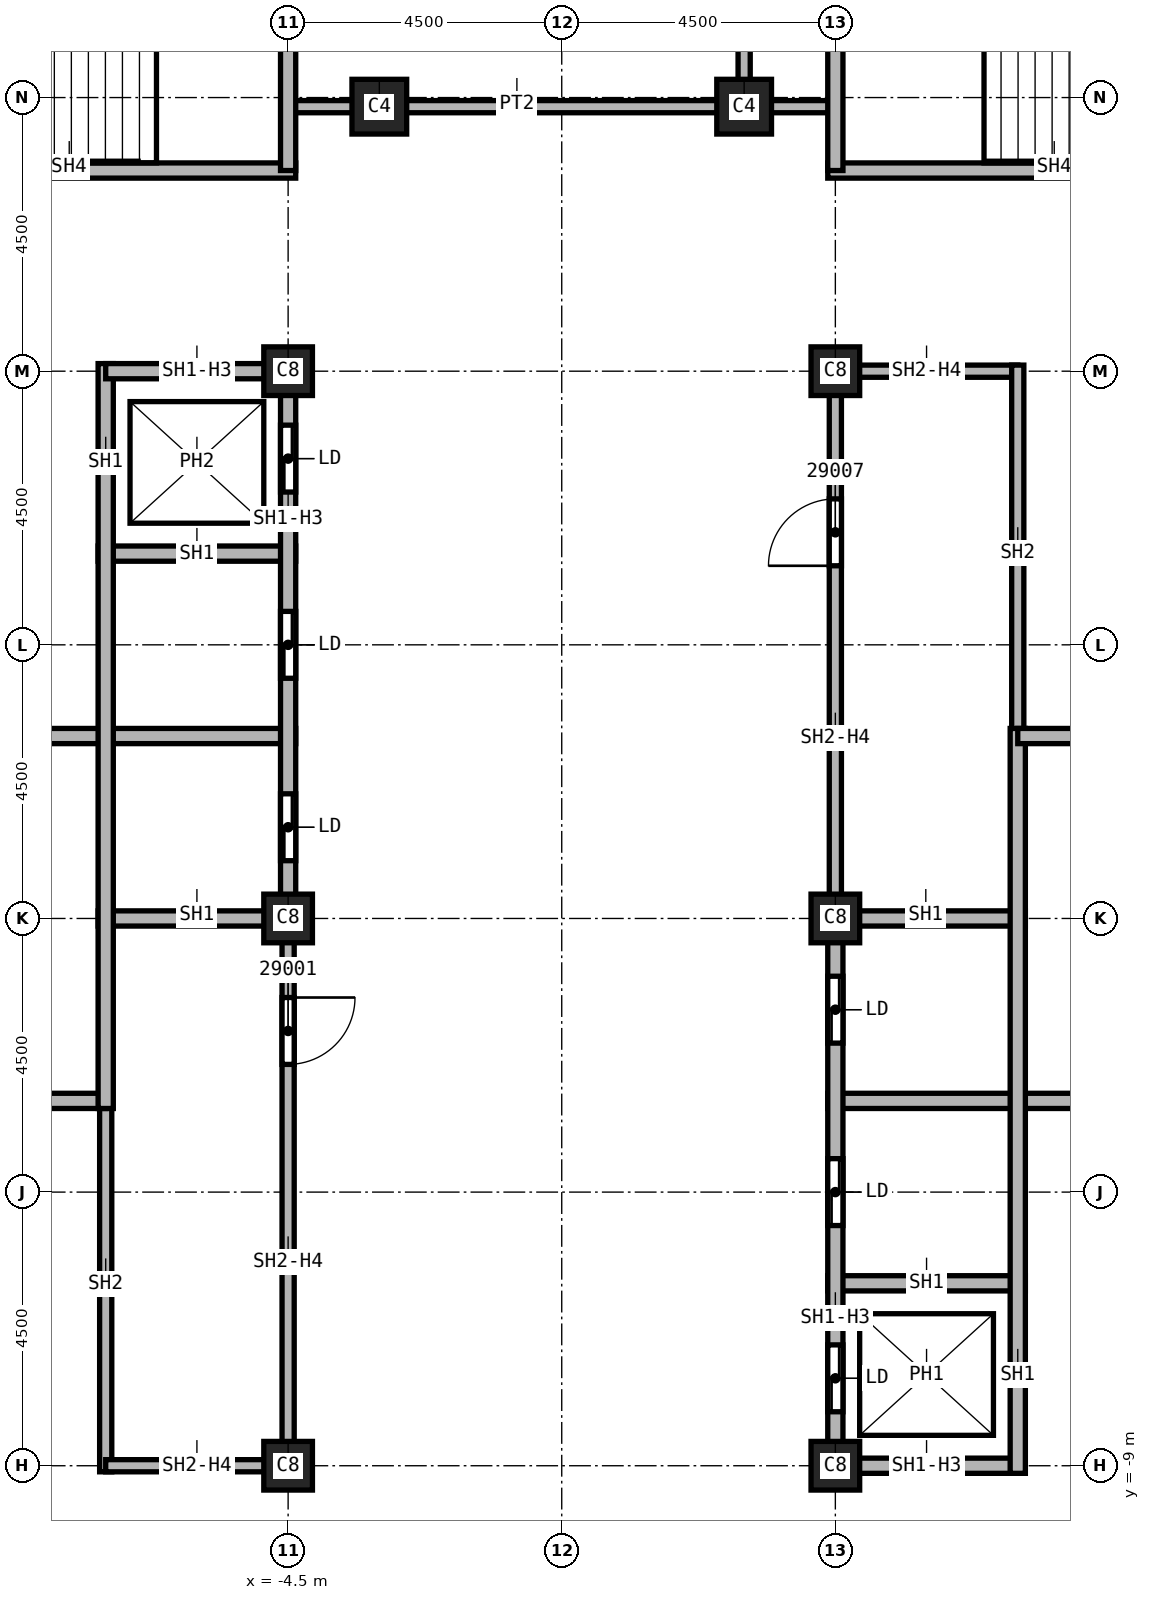
"""IFC4 building model, lengths in metres.
Left out: names, types, materials, properties, quantities, classifications, styles, units other than length and angle.
Written with IfcOpenShell. Run it as: python <this file> out.ifc"""

import sys

from ifc_helpers import new_model, si_unit, direction, frame, frame_2d, origin, origin_2d, place, context, subcontext, project, spatial, rectangle, extrude, element, fill, save


model = new_model("IFC4")
c1 = context("Model", 3, precision=1e-05, world=origin(), true_north=direction((0.0, 1.0)))
c2 = subcontext(c1, "Body", "Model", "MODEL_VIEW")
j1 = project(units=[si_unit("LENGTHUNIT", "METRE"), si_unit("PLANEANGLEUNIT", "RADIAN")], contexts=[c1])
p1 = place(None, origin())
s1 = spatial("IfcSite", under=j1, at=p1, CompositionType="ELEMENT")
p2 = place(p1, origin())
s2 = spatial("IfcBuilding", under=s1, at=p2, CompositionType="ELEMENT")
p3 = place(p2, frame((0.0, 0.0, 294.0)))
s3 = spatial("IfcBuildingStorey", under=s2, at=p3, CompositionType="ELEMENT", Elevation=294.0)
for number, where, z_axis, x_axis in (
    (1, (4.5, 0.0, 0.0), (0.0, 0.0, 1.0), (1.0, 0.0, 0.0)),
    (2, (4.5, 9.0, 0.0), (0.0, 0.0, 1.0), (1.0, 0.0, 0.0)),
    (3, (4.5, -9.0, 0.0), (0.0, 0.0, 1.0), (1.0, 0.0, 0.0)),
    (4, (-4.5, 0.0, 0.0), (0.0, 0.0, 1.0), (1.0, 0.0, 0.0)),
    (5, (-4.5, 9.0, 0.0), (0.0, 0.0, 1.0), (1.0, 0.0, 0.0)),
    (6, (-4.5, -9.0, 0.0), (0.0, 0.0, 1.0), (1.0, 0.0, 0.0)),
):
    element("IfcColumn", number, at=place(p3, frame(where, z_axis=z_axis, x_axis=x_axis)), inside=s3, PredefinedType="COLUMN", context=c2, shape_type="SweptSolid", body=[
        extrude(rectangle(XDim=0.8, YDim=0.8, at=origin_2d()), origin(), (0.0, 0.0, 1.0), 5.74),
    ])
for number, where, z_axis, x_axis in (
    (7, (3.0, 13.35, 0.0), (0.0, 0.18, 0.984), (-1.0, 0.0, 0.0)),
    (8, (-3.0, 13.35, 0.0), (0.0, 0.18, 0.984), (-1.0, 0.0, 0.0)),
):
    element("IfcColumn", number, at=place(p3, frame(where, z_axis=z_axis, x_axis=x_axis)), inside=s3, PredefinedType="COLUMN", context=c2, shape_type="SweptSolid", body=[
        extrude(rectangle(XDim=0.9, YDim=0.9, at=origin_2d()), origin(), (0.0, 0.0, 1.0), 5.835),
    ])
p4 = place(p3, frame((-4.5, 13.35, 0.0), z_axis=(0.0, 0.0, 1.0), x_axis=(1.0, 0.0, 0.0)))
e9 = element("IfcWall", 9, at=p4, inside=s3, PredefinedType="PARTITIONING", context=c2, shape_type="SweptSolid", body=[
    extrude(rectangle(XDim=9.0, YDim=0.2, at=frame_2d((4.5, 0.0))), origin(), (0.0, 0.0, 1.0), 5.74),
])
p5 = place(p3, frame((3.0, 21.9, 0.0), z_axis=(0.0, 0.0, 1.0), x_axis=(0.0, -1.0, 0.0)))
e10 = element("IfcWall", 10, at=p5, inside=s3, PredefinedType="PARTITIONING", context=c2, shape_type="SweptSolid", body=[
    extrude(rectangle(XDim=8.55, YDim=0.2, at=frame_2d((4.275, 0.0))), origin(), (0.0, 0.0, 1.0), 5.74),
])
p6 = place(p3, frame((-7.5, -9.1, 0.0), z_axis=(0.0, 0.0, 1.0), x_axis=(0.0, 1.0, 0.0)))
e11 = element("IfcWall", 11, at=p6, inside=s3, PredefinedType="SOLIDWALL", context=c2, shape_type="SweptSolid", body=[
    extrude(rectangle(XDim=6.225, YDim=0.2, at=frame_2d((3.113, 0.0))), origin(), (0.0, 0.0, 1.0), 5.74),
])
p7 = place(p3, frame((-4.5, -9.0, 0.0), z_axis=(0.0, 0.0, 1.0), x_axis=(-1.0, 0.0, 0.0)))
e12 = element("IfcWall", 12, at=p7, inside=s3, PredefinedType="SOLIDWALL", context=c2, shape_type="SweptSolid", body=[
    extrude(rectangle(XDim=3.0, YDim=0.2, at=frame_2d((1.5, 0.0))), origin(), (0.0, 0.0, 1.0), 5.062),
])
p8 = place(p3, frame((-4.5, 0.0, 0.0), z_axis=(0.0, 0.0, 1.0), x_axis=(0.0, -1.0, 0.0)))
e13 = element("IfcWall", 13, at=p8, inside=s3, PredefinedType="SOLIDWALL", context=c2, shape_type="SweptSolid", body=[
    extrude(rectangle(XDim=9.1, YDim=0.2, at=frame_2d((4.55, 0.0))), origin(), (0.0, 0.0, 1.0), 5.062),
])
p9 = place(p8, frame((1.3, 0.0, 0.0)))
e14 = element("IfcOpeningElement", 14, at=p9, cuts=e13, PredefinedType="OPENING", context=c2, shape_type="SweptSolid", body=[
    extrude(rectangle(XDim=1.1, YDim=2.1, at=frame_2d((0.55, 1.05))), frame((0.0, 0.1, 0.0), z_axis=(0.0, -1.0, 0.0), x_axis=(1.0, 0.0, 0.0)), (0.0, 0.0, 1.0), 0.2),
])
p10 = place(p3, frame((4.5, 0.0, 0.0), z_axis=(0.0, 0.0, 1.0), x_axis=(0.0, 1.0, 0.0)))
e15 = element("IfcWall", 15, at=p10, inside=s3, PredefinedType="SOLIDWALL", context=c2, shape_type="SweptSolid", body=[
    extrude(rectangle(XDim=9.1, YDim=0.2, at=frame_2d((4.55, 0.0))), origin(), (0.0, 0.0, 1.0), 5.062),
])
p11 = place(p10, frame((5.8, 0.0, 0.0)))
e16 = element("IfcOpeningElement", 16, at=p11, cuts=e15, PredefinedType="OPENING", context=c2, shape_type="SweptSolid", body=[
    extrude(rectangle(XDim=1.1, YDim=2.1, at=frame_2d((0.55, 1.05))), frame((0.0, 0.1, 0.0), z_axis=(0.0, -1.0, 0.0), x_axis=(1.0, 0.0, 0.0)), (0.0, 0.0, 1.0), 0.2),
])
p12 = place(p3, frame((4.5, 9.0, 0.0), z_axis=(0.0, 0.0, 1.0), x_axis=(1.0, 0.0, 0.0)))
e17 = element("IfcWall", 17, at=p12, inside=s3, PredefinedType="SOLIDWALL", context=c2, shape_type="SweptSolid", body=[
    extrude(rectangle(XDim=3.0, YDim=0.2, at=frame_2d((1.5, 0.0))), origin(), (0.0, 0.0, 1.0), 5.062),
])
p13 = place(p3, frame((7.5, 9.1, 0.0), z_axis=(0.0, 0.0, 1.0), x_axis=(0.0, -1.0, 0.0)))
e18 = element("IfcWall", 18, at=p13, inside=s3, PredefinedType="SOLIDWALL", context=c2, shape_type="SweptSolid", body=[
    extrude(rectangle(XDim=6.225, YDim=0.2, at=frame_2d((3.113, 0.0))), origin(), (0.0, 0.0, 1.0), 5.74),
])
p14 = place(p3, frame((-13.625, 3.0, 0.0), z_axis=(0.0, 0.0, 1.0), x_axis=(1.0, 0.0, 0.0)))
e19 = element("IfcWall", 19, at=p14, inside=s3, PredefinedType="SOLIDWALL", context=c2, shape_type="SweptSolid", body=[
    extrude(rectangle(XDim=9.25, YDim=0.25, at=frame_2d((4.625, 0.0))), origin(), (0.0, 0.0, 1.0), 5.74),
])
p15 = place(p14, frame((3.25, 0.0, 0.0)))
e20 = element("IfcOpeningElement", 20, at=p15, cuts=e19, PredefinedType="OPENING", context=c2, shape_type="SweptSolid", body=[
    extrude(rectangle(XDim=1.1, YDim=2.1, at=frame_2d((0.55, 1.05))), frame((0.0, 0.125, 0.0), z_axis=(0.0, -1.0, 0.0), x_axis=(1.0, 0.0, 0.0)), (0.0, 0.0, 1.0), 0.25),
])
p16 = place(p3, frame((-13.625, -3.0, 0.0), z_axis=(0.0, 0.0, 1.0), x_axis=(1.0, 0.0, 0.0)))
e21 = element("IfcWall", 21, at=p16, inside=s3, PredefinedType="SOLIDWALL", context=c2, shape_type="SweptSolid", body=[
    extrude(rectangle(XDim=6.125, YDim=0.25, at=frame_2d((3.062, 0.0))), origin(), (0.0, 0.0, 1.0), 5.74),
])
p17 = place(p16, frame((3.25, 0.0, 0.0)))
e22 = element("IfcOpeningElement", 22, at=p17, cuts=e21, PredefinedType="OPENING", context=c2, shape_type="SweptSolid", body=[
    extrude(rectangle(XDim=1.1, YDim=2.1, at=frame_2d((0.55, 1.05))), frame((0.0, 0.125, 0.0), z_axis=(0.0, -1.0, 0.0), x_axis=(1.0, 0.0, 0.0)), (0.0, 0.0, 1.0), 0.25),
])
for number, where, z_axis, x_axis in (
    (23, (-7.625, 0.0, 0.0), (0.0, 0.0, 1.0), (1.0, 0.0, 0.0)),
    (24, (-7.625, 6.0, 0.0), (0.0, 0.0, 1.0), (1.0, 0.0, 0.0)),
):
    element("IfcWall", number, at=place(p3, frame(where, z_axis=z_axis, x_axis=x_axis)), inside=s3, PredefinedType="SOLIDWALL", context=c2, shape_type="SweptSolid", body=[
        extrude(rectangle(XDim=3.25, YDim=0.25, at=frame_2d((1.625, 0.0))), origin(), (0.0, 0.0, 1.0), 5.74),
    ])
p18 = place(p3, frame((-7.5, -3.125, 0.0), z_axis=(0.0, 0.0, 1.0), x_axis=(0.0, 1.0, 0.0)))
e25 = element("IfcWall", 25, at=p18, inside=s3, PredefinedType="SOLIDWALL", context=c2, shape_type="SweptSolid", body=[
    extrude(rectangle(XDim=12.25, YDim=0.25, at=frame_2d((6.125, 0.0))), origin(), (0.0, 0.0, 1.0), 5.74),
])
p19 = place(p3, frame((-7.5, 9.0, 0.0), z_axis=(0.0, 0.0, 1.0), x_axis=(1.0, 0.0, 0.0)))
e26 = element("IfcWall", 26, at=p19, inside=s3, PredefinedType="SOLIDWALL", context=c2, shape_type="SweptSolid", body=[
    extrude(rectangle(XDim=3.0, YDim=0.25, at=frame_2d((1.5, 0.0))), origin(), (0.0, 0.0, 1.0), 5.062),
])
p20 = place(p3, frame((-4.5, 9.125, 0.0), z_axis=(0.0, 0.0, 1.0), x_axis=(0.0, -1.0, 0.0)))
e27 = element("IfcWall", 27, at=p20, inside=s3, PredefinedType="SOLIDWALL", context=c2, shape_type="SweptSolid", body=[
    extrude(rectangle(XDim=9.125, YDim=0.25, at=frame_2d((4.562, 0.0))), origin(), (0.0, 0.0, 1.0), 5.062),
])
p21 = place(p20, frame((7.075, 0.0, 0.0)))
e28 = element("IfcOpeningElement", 28, at=p21, cuts=e27, PredefinedType="OPENING", context=c2, shape_type="SweptSolid", body=[
    extrude(rectangle(XDim=1.1, YDim=2.1, at=frame_2d((0.55, 1.05))), frame((0.0, 0.125, 0.0), z_axis=(0.0, -1.0, 0.0), x_axis=(1.0, 0.0, 0.0)), (0.0, 0.0, 1.0), 0.25),
])
p22 = place(p20, frame((4.075, 0.0, 0.0)))
e29 = element("IfcOpeningElement", 29, at=p22, cuts=e27, PredefinedType="OPENING", context=c2, shape_type="SweptSolid", body=[
    extrude(rectangle(XDim=1.1, YDim=2.1, at=frame_2d((0.55, 1.05))), frame((0.0, 0.125, 0.0), z_axis=(0.0, -1.0, 0.0), x_axis=(1.0, 0.0, 0.0)), (0.0, 0.0, 1.0), 0.25),
])
p23 = place(p20, frame((1.012, 0.0, 0.0)))
e30 = element("IfcOpeningElement", 30, at=p23, cuts=e27, PredefinedType="OPENING", context=c2, shape_type="SweptSolid", body=[
    extrude(rectangle(XDim=1.1, YDim=2.1, at=frame_2d((0.55, 1.05))), frame((0.0, 0.125, 0.0), z_axis=(0.0, -1.0, 0.0), x_axis=(1.0, 0.0, 0.0)), (0.0, 0.0, 1.0), 0.25),
])
p24 = place(p3, frame((4.375, -6.0, 0.0), z_axis=(0.0, 0.0, 1.0), x_axis=(1.0, 0.0, 0.0)))
e31 = element("IfcWall", 31, at=p24, inside=s3, PredefinedType="SOLIDWALL", context=c2, shape_type="SweptSolid", body=[
    extrude(rectangle(XDim=3.25, YDim=0.25, at=frame_2d((1.625, 0.0))), origin(), (0.0, 0.0, 1.0), 5.74),
])
p25 = place(p3, frame((4.375, -3.0, 0.0), z_axis=(0.0, 0.0, 1.0), x_axis=(1.0, 0.0, 0.0)))
e32 = element("IfcWall", 32, at=p25, inside=s3, PredefinedType="SOLIDWALL", context=c2, shape_type="SweptSolid", body=[
    extrude(rectangle(XDim=9.25, YDim=0.25, at=frame_2d((4.625, 0.0))), origin(), (0.0, 0.0, 1.0), 5.74),
])
p26 = place(p25, frame((4.125, 0.0, 0.0)))
e33 = element("IfcOpeningElement", 33, at=p26, cuts=e32, PredefinedType="OPENING", context=c2, shape_type="SweptSolid", body=[
    extrude(rectangle(XDim=1.1, YDim=2.1, at=frame_2d((0.55, 1.05))), frame((0.0, 0.125, 0.0), z_axis=(0.0, -1.0, 0.0), x_axis=(1.0, 0.0, 0.0)), (0.0, 0.0, 1.0), 0.25),
])
p27 = place(p3, frame((4.375, 0.0, 0.0), z_axis=(0.0, 0.0, 1.0), x_axis=(1.0, 0.0, 0.0)))
e34 = element("IfcWall", 34, at=p27, inside=s3, PredefinedType="SOLIDWALL", context=c2, shape_type="SweptSolid", body=[
    extrude(rectangle(XDim=3.25, YDim=0.25, at=frame_2d((1.625, 0.0))), origin(), (0.0, 0.0, 1.0), 5.74),
])
p28 = place(p3, frame((4.5, -9.125, 0.0), z_axis=(0.0, 0.0, 1.0), x_axis=(0.0, 1.0, 0.0)))
e35 = element("IfcWall", 35, at=p28, inside=s3, PredefinedType="SOLIDWALL", context=c2, shape_type="SweptSolid", body=[
    extrude(rectangle(XDim=9.125, YDim=0.25, at=frame_2d((4.562, 0.0))), origin(), (0.0, 0.0, 1.0), 5.062),
])
p29 = place(p28, frame((1.012, 0.0, 0.0)))
e36 = element("IfcOpeningElement", 36, at=p29, cuts=e35, PredefinedType="OPENING", context=c2, shape_type="SweptSolid", body=[
    extrude(rectangle(XDim=1.1, YDim=2.1, at=frame_2d((0.55, 1.05))), frame((0.0, 0.125, 0.0), z_axis=(0.0, -1.0, 0.0), x_axis=(1.0, 0.0, 0.0)), (0.0, 0.0, 1.0), 0.25),
])
p30 = place(p28, frame((4.075, 0.0, 0.0)))
e37 = element("IfcOpeningElement", 37, at=p30, cuts=e35, PredefinedType="OPENING", context=c2, shape_type="SweptSolid", body=[
    extrude(rectangle(XDim=1.1, YDim=2.1, at=frame_2d((0.55, 1.05))), frame((0.0, 0.125, 0.0), z_axis=(0.0, -1.0, 0.0), x_axis=(1.0, 0.0, 0.0)), (0.0, 0.0, 1.0), 0.25),
])
p31 = place(p28, frame((7.075, 0.0, 0.0)))
e38 = element("IfcOpeningElement", 38, at=p31, cuts=e35, PredefinedType="OPENING", context=c2, shape_type="SweptSolid", body=[
    extrude(rectangle(XDim=1.1, YDim=2.1, at=frame_2d((0.55, 1.05))), frame((0.0, 0.125, 0.0), z_axis=(0.0, -1.0, 0.0), x_axis=(1.0, 0.0, 0.0)), (0.0, 0.0, 1.0), 0.25),
])
p32 = place(p3, frame((7.5, -9.0, 0.0), z_axis=(0.0, 0.0, 1.0), x_axis=(-1.0, 0.0, 0.0)))
e39 = element("IfcWall", 39, at=p32, inside=s3, PredefinedType="SOLIDWALL", context=c2, shape_type="SweptSolid", body=[
    extrude(rectangle(XDim=3.0, YDim=0.25, at=frame_2d((1.5, 0.0))), origin(), (0.0, 0.0, 1.0), 5.062),
])
p33 = place(p3, frame((7.5, 3.125, 0.0), z_axis=(0.0, 0.0, 1.0), x_axis=(0.0, -1.0, 0.0)))
e40 = element("IfcWall", 40, at=p33, inside=s3, PredefinedType="SOLIDWALL", context=c2, shape_type="SweptSolid", body=[
    extrude(rectangle(XDim=12.25, YDim=0.25, at=frame_2d((6.125, 0.0))), origin(), (0.0, 0.0, 1.0), 5.74),
])
p34 = place(p3, frame((7.5, 3.0, 0.0), z_axis=(0.0, 0.0, 1.0), x_axis=(1.0, 0.0, 0.0)))
e41 = element("IfcWall", 41, at=p34, inside=s3, PredefinedType="SOLIDWALL", context=c2, shape_type="SweptSolid", body=[
    extrude(rectangle(XDim=6.125, YDim=0.25, at=frame_2d((3.062, 0.0))), origin(), (0.0, 0.0, 1.0), 5.74),
])
p35 = place(p34, frame((1.0, 0.0, 0.0)))
e42 = element("IfcOpeningElement", 42, at=p35, cuts=e41, PredefinedType="OPENING", context=c2, shape_type="SweptSolid", body=[
    extrude(rectangle(XDim=1.1, YDim=2.1, at=frame_2d((0.55, 1.05))), frame((0.0, 0.125, 0.0), z_axis=(0.0, -1.0, 0.0), x_axis=(1.0, 0.0, 0.0)), (0.0, 0.0, 1.0), 0.25),
])
p36 = place(p3, frame((-13.625, 12.3, 0.0), z_axis=(0.0, 0.0, 1.0), x_axis=(1.0, 0.0, 0.0)))
e43 = element("IfcWall", 43, at=p36, inside=s3, PredefinedType="SOLIDWALL", context=c2, shape_type="SweptSolid", body=[
    extrude(rectangle(XDim=9.25, YDim=0.25, at=frame_2d((4.625, 0.0))), origin(), (0.0, 0.0, 1.0), 5.74),
])
p37 = place(p36, frame((0.85, 0.0, 0.0)))
e44 = element("IfcOpeningElement", 44, at=p37, cuts=e43, PredefinedType="OPENING", context=c2, shape_type="SweptSolid", body=[
    extrude(rectangle(XDim=1.2, YDim=2.1, at=frame_2d((0.6, 1.05))), frame((0.0, 0.125, 0.0), z_axis=(0.0, -1.0, 0.0), x_axis=(1.0, 0.0, 0.0)), (0.0, 0.0, 1.0), 0.25),
])
p38 = place(p3, frame((-4.5, 16.8, 0.0), z_axis=(0.0, 0.0, 1.0), x_axis=(0.0, -1.0, 0.0)))
e45 = element("IfcWall", 45, at=p38, inside=s3, PredefinedType="SOLIDWALL", context=c2, shape_type="SweptSolid", body=[
    extrude(rectangle(XDim=4.5, YDim=0.25, at=frame_2d((2.25, 0.0))), origin(), (0.0, 0.0, 1.0), 5.74),
])
p39 = place(p3, frame((4.375, 12.3, 0.0), z_axis=(0.0, 0.0, 1.0), x_axis=(1.0, 0.0, 0.0)))
e46 = element("IfcWall", 46, at=p39, inside=s3, PredefinedType="SOLIDWALL", context=c2, shape_type="SweptSolid", body=[
    extrude(rectangle(XDim=9.25, YDim=0.25, at=frame_2d((4.625, 0.0))), origin(), (0.0, 0.0, 1.0), 5.74),
])
p40 = place(p39, frame((7.2, 0.0, 0.0)))
e47 = element("IfcOpeningElement", 47, at=p40, cuts=e46, PredefinedType="OPENING", context=c2, shape_type="SweptSolid", body=[
    extrude(rectangle(XDim=1.2, YDim=2.1, at=frame_2d((0.6, 1.05))), frame((0.0, 0.125, 0.0), z_axis=(0.0, -1.0, 0.0), x_axis=(1.0, 0.0, 0.0)), (0.0, 0.0, 1.0), 0.25),
])
p41 = place(p3, frame((4.5, 12.3, 0.0), z_axis=(0.0, 0.0, 1.0), x_axis=(0.0, 1.0, 0.0)))
e48 = element("IfcWall", 48, at=p41, inside=s3, PredefinedType="SOLIDWALL", context=c2, shape_type="SweptSolid", body=[
    extrude(rectangle(XDim=4.5, YDim=0.25, at=frame_2d((2.25, 0.0))), origin(), (0.0, 0.0, 1.0), 5.74),
])
p42 = place(p9, origin())
e49 = element("IfcDoor", 49, at=p42, inside=s3, OperationType="SINGLE_SWING_RIGHT", PredefinedType="DOOR", context=c2, shape_type="SweptSolid", body=[
    extrude(rectangle(XDim=1.1, YDim=2.1, at=frame_2d((0.55, 1.05))), frame((0.0, 0.025, 0.0), z_axis=(0.0, -1.0, 0.0), x_axis=(1.0, 0.0, 0.0)), (0.0, 0.0, 1.0), 0.05),
])
fill(e14, e49)
p43 = place(p11, origin())
e50 = element("IfcDoor", 50, at=p43, inside=s3, OperationType="SINGLE_SWING_RIGHT", PredefinedType="DOOR", context=c2, shape_type="SweptSolid", body=[
    extrude(rectangle(XDim=1.1, YDim=2.1, at=frame_2d((0.55, 1.05))), frame((0.0, 0.025, 0.0), z_axis=(0.0, -1.0, 0.0), x_axis=(1.0, 0.0, 0.0)), (0.0, 0.0, 1.0), 0.05),
])
fill(e16, e50)
p44 = place(p21, origin())
e51 = element("IfcDoor", 51, at=p44, inside=s3, OperationType="SLIDING_TO_LEFT", PredefinedType="DOOR", context=c2, shape_type="SweptSolid", body=[
    extrude(rectangle(XDim=1.1, YDim=2.1, at=frame_2d((0.55, 1.05))), frame((0.0, 0.025, 0.0), z_axis=(0.0, -1.0, 0.0), x_axis=(1.0, 0.0, 0.0)), (0.0, 0.0, 1.0), 0.05),
])
fill(e28, e51)
p45 = place(p22, origin())
e52 = element("IfcDoor", 52, at=p45, inside=s3, OperationType="SLIDING_TO_LEFT", PredefinedType="DOOR", context=c2, shape_type="SweptSolid", body=[
    extrude(rectangle(XDim=1.1, YDim=2.1, at=frame_2d((0.55, 1.05))), frame((0.0, 0.025, 0.0), z_axis=(0.0, -1.0, 0.0), x_axis=(1.0, 0.0, 0.0)), (0.0, 0.0, 1.0), 0.05),
])
fill(e29, e52)
p46 = place(p23, origin())
e53 = element("IfcDoor", 53, at=p46, inside=s3, OperationType="SLIDING_TO_LEFT", PredefinedType="DOOR", context=c2, shape_type="SweptSolid", body=[
    extrude(rectangle(XDim=1.1, YDim=2.1, at=frame_2d((0.55, 1.05))), frame((0.0, 0.025, 0.0), z_axis=(0.0, -1.0, 0.0), x_axis=(1.0, 0.0, 0.0)), (0.0, 0.0, 1.0), 0.05),
])
fill(e30, e53)
p47 = place(p29, origin())
e54 = element("IfcDoor", 54, at=p47, inside=s3, OperationType="SLIDING_TO_LEFT", PredefinedType="DOOR", context=c2, shape_type="SweptSolid", body=[
    extrude(rectangle(XDim=1.1, YDim=2.1, at=frame_2d((0.55, 1.05))), frame((0.0, 0.025, 0.0), z_axis=(0.0, -1.0, 0.0), x_axis=(1.0, 0.0, 0.0)), (0.0, 0.0, 1.0), 0.05),
])
fill(e36, e54)
p48 = place(p30, origin())
e55 = element("IfcDoor", 55, at=p48, inside=s3, OperationType="SLIDING_TO_LEFT", PredefinedType="DOOR", context=c2, shape_type="SweptSolid", body=[
    extrude(rectangle(XDim=1.1, YDim=2.1, at=frame_2d((0.55, 1.05))), frame((0.0, 0.025, 0.0), z_axis=(0.0, -1.0, 0.0), x_axis=(1.0, 0.0, 0.0)), (0.0, 0.0, 1.0), 0.05),
])
fill(e37, e55)
p49 = place(p31, origin())
e56 = element("IfcDoor", 56, at=p49, inside=s3, OperationType="SLIDING_TO_LEFT", PredefinedType="DOOR", context=c2, shape_type="SweptSolid", body=[
    extrude(rectangle(XDim=1.1, YDim=2.1, at=frame_2d((0.55, 1.05))), frame((0.0, 0.025, 0.0), z_axis=(0.0, -1.0, 0.0), x_axis=(1.0, 0.0, 0.0)), (0.0, 0.0, 1.0), 0.05),
])
fill(e38, e56)
save(model, sys.argv[1])
